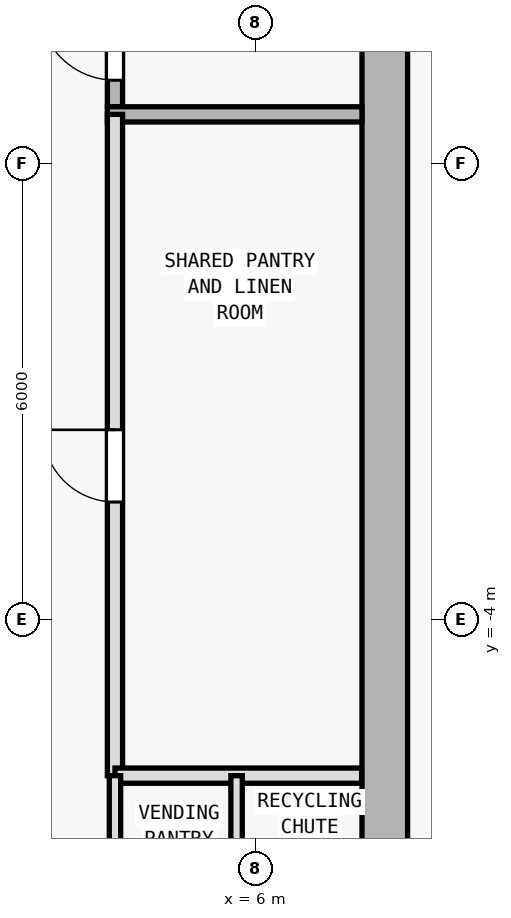
"""IFC4 building model, lengths in metres.
Left out: names, types, materials, properties, quantities, classifications, styles, units other than length and angle.
Written with IfcOpenShell. Run it as: python <this file> out.ifc"""

import sys

from ifc_helpers import new_model, si_unit, direction, frame, frame_2d, origin, origin_2d, place, context, subcontext, project, spatial, rectangle, i_section, extrude, element, fill, save


model = new_model("IFC4")
c1 = context("Model", 3, precision=1e-05, world=origin(), true_north=direction((0.0, 1.0)))
c2 = subcontext(c1, "Body", "Model", "MODEL_VIEW")
j1 = project(units=[si_unit("LENGTHUNIT", "METRE"), si_unit("PLANEANGLEUNIT", "RADIAN")], contexts=[c1])
p1 = place(None, origin())
s1 = spatial("IfcSite", under=j1, at=p1, CompositionType="ELEMENT")
p2 = place(p1, origin())
s2 = spatial("IfcBuilding", under=s1, at=p2, CompositionType="ELEMENT")
p3 = place(p2, frame((0.0, 0.0, 114.9)))
s3 = spatial("IfcBuildingStorey", under=s2, at=p3, CompositionType="ELEMENT", Elevation=114.9)
p4 = place(p3, frame((7.7, 0.4, 0.0), z_axis=(0.0, 0.0, 1.0), x_axis=(1.0, 0.0, 0.0)))
e1 = element("IfcColumn", 1, at=p4, inside=s3, PredefinedType="COLUMN", context=c2, shape_type="SweptSolid", body=[
    extrude(i_section(OverallWidth=0.409, OverallDepth=0.425, WebThickness=0.021, FlangeThickness=0.034, FilletRadius=0.015, at=origin_2d()), origin(), (0.0, 0.0, 1.0), 3.6),
])
p5 = place(p3, frame((7.7, 9.9, 0.0), z_axis=(0.0, 0.0, 1.0), x_axis=(0.0, -1.0, 0.0)))
e2 = element("IfcWall", 2, at=p5, inside=s3, PredefinedType="SHEAR", context=c2, shape_type="SweptSolid", body=[
    extrude(rectangle(XDim=19.0, YDim=0.6, at=frame_2d((9.5, 0.0))), origin(), (0.0, 0.0, 1.0), 3.35),
])
p6 = place(p3, frame((4.15, 2.75, 0.0), z_axis=(0.0, 0.0, 1.0), x_axis=(0.0, 1.0, 0.0)))
e3 = element("IfcWall", 3, at=p6, inside=s3, PredefinedType="SOLIDWALL", context=c2, shape_type="SweptSolid", body=[
    extrude(rectangle(XDim=7.15, YDim=0.2, at=frame_2d((3.575, 0.0))), origin(), (0.0, 0.0, 1.0), 3.35),
])
p7 = place(p6, frame((0.35, 0.0, 0.0)))
e4 = element("IfcOpeningElement", 4, at=p7, cuts=e3, PredefinedType="OPENING", context=c2, shape_type="SweptSolid", body=[
    extrude(rectangle(XDim=1.0, YDim=2.15, at=frame_2d((0.5, 1.075))), frame((0.0, 0.11, 0.0), z_axis=(0.0, -1.0, 0.0), x_axis=(1.0, 0.0, 0.0)), (0.0, 0.0, 1.0), 0.22),
])
p8 = place(p3, frame((4.05, 2.65, 0.0), z_axis=(0.0, 0.0, 1.0), x_axis=(1.0, 0.0, 0.0)))
e5 = element("IfcWall", 5, at=p8, inside=s3, PredefinedType="SOLIDWALL", context=c2, shape_type="SweptSolid", body=[
    extrude(rectangle(XDim=3.35, YDim=0.2, at=frame_2d((1.675, 0.0))), origin(), (0.0, 0.0, 1.0), 3.35),
])
p9 = place(p3, frame((4.15, -6.05, 0.0), z_axis=(0.0, 0.0, 1.0), x_axis=(0.0, 1.0, 0.0)))
e6 = element("IfcWall", 6, at=p9, inside=s3, PredefinedType="SOLIDWALL", context=c2, shape_type="SweptSolid", body=[
    extrude(rectangle(XDim=8.7, YDim=0.2, at=frame_2d((4.35, 0.0))), origin(), (0.0, 0.0, 1.0), 3.35),
])
p10 = place(p9, frame((3.6, 0.0, 0.0)))
e7 = element("IfcOpeningElement", 7, at=p10, cuts=e6, PredefinedType="OPENING", context=c2, shape_type="SweptSolid", body=[
    extrude(rectangle(XDim=0.95, YDim=2.1, at=frame_2d((0.475, 1.05))), frame((0.0, 0.11, 0.0), z_axis=(0.0, -1.0, 0.0), x_axis=(1.0, 0.0, 0.0)), (0.0, 0.0, 1.0), 0.22),
])
p11 = place(p3, frame((4.15, -6.05, 0.0), z_axis=(0.0, 0.0, 1.0), x_axis=(1.0, 0.0, 0.0)))
e8 = element("IfcWall", 8, at=p11, inside=s3, PredefinedType="SOLIDWALL", context=c2, shape_type="SweptSolid", body=[
    extrude(rectangle(XDim=3.245, YDim=0.2, at=frame_2d((1.623, 0.0))), origin(), (0.0, 0.0, 1.0), 3.35),
])
p12 = place(p3, frame((4.15, -9.095, 0.0), z_axis=(0.0, 0.0, 1.0), x_axis=(0.0, 1.0, 0.0)))
e9 = element("IfcWall", 9, at=p12, inside=s3, PredefinedType="PARTITIONING", context=c2, shape_type="SweptSolid", body=[
    extrude(rectangle(XDim=3.045, YDim=0.15, at=frame_2d((1.522, 0.0))), origin(), (0.0, 0.0, 1.0), 3.35),
])
p13 = place(p12, frame((0.845, 0.0, 0.0)))
e10 = element("IfcOpeningElement", 10, at=p13, cuts=e9, PredefinedType="OPENING", context=c2, shape_type="SweptSolid", body=[
    extrude(rectangle(XDim=0.9, YDim=2.1, at=frame_2d((0.45, 1.05))), frame((0.0, 0.085, 0.0), z_axis=(0.0, -1.0, 0.0), x_axis=(1.0, 0.0, 0.0)), (0.0, 0.0, 1.0), 0.17),
])
p14 = place(p3, frame((5.75, -9.095, 0.0), z_axis=(0.0, 0.0, 1.0), x_axis=(0.0, 1.0, 0.0)))
e11 = element("IfcWall", 11, at=p14, inside=s3, PredefinedType="PARTITIONING", context=c2, shape_type="SweptSolid", body=[
    extrude(rectangle(XDim=3.045, YDim=0.15, at=frame_2d((1.522, 0.0))), origin(), (0.0, 0.0, 1.0), 3.35),
])
p15 = place(p14, frame((0.845, 0.0, 0.0)))
e12 = element("IfcOpeningElement", 12, at=p15, cuts=e11, PredefinedType="OPENING", context=c2, shape_type="SweptSolid", body=[
    extrude(rectangle(XDim=0.9, YDim=2.1, at=frame_2d((0.45, 1.05))), frame((0.0, 0.085, 0.0), z_axis=(0.0, -1.0, 0.0), x_axis=(1.0, 0.0, 0.0)), (0.0, 0.0, 1.0), 0.17),
])
p16 = place(p7, origin())
e13 = element("IfcDoor", 13, at=p16, inside=s3, OperationType="SINGLE_SWING_RIGHT", PredefinedType="DOOR", context=c2, shape_type="SweptSolid", body=[
    extrude(rectangle(XDim=1.0, YDim=2.15, at=frame_2d((0.5, 1.075))), frame((0.0, 0.025, 0.0), z_axis=(0.0, -1.0, 0.0), x_axis=(1.0, 0.0, 0.0)), (0.0, 0.0, 1.0), 0.05),
])
fill(e4, e13)
p17 = place(p10, origin())
e14 = element("IfcDoor", 14, at=p17, inside=s3, OperationType="SINGLE_SWING_RIGHT", PredefinedType="DOOR", context=c2, shape_type="SweptSolid", body=[
    extrude(rectangle(XDim=0.95, YDim=2.1, at=frame_2d((0.475, 1.05))), frame((0.0, 0.025, 0.0), z_axis=(0.0, -1.0, 0.0), x_axis=(1.0, 0.0, 0.0)), (0.0, 0.0, 1.0), 0.05),
])
fill(e7, e14)
save(model, sys.argv[1])
